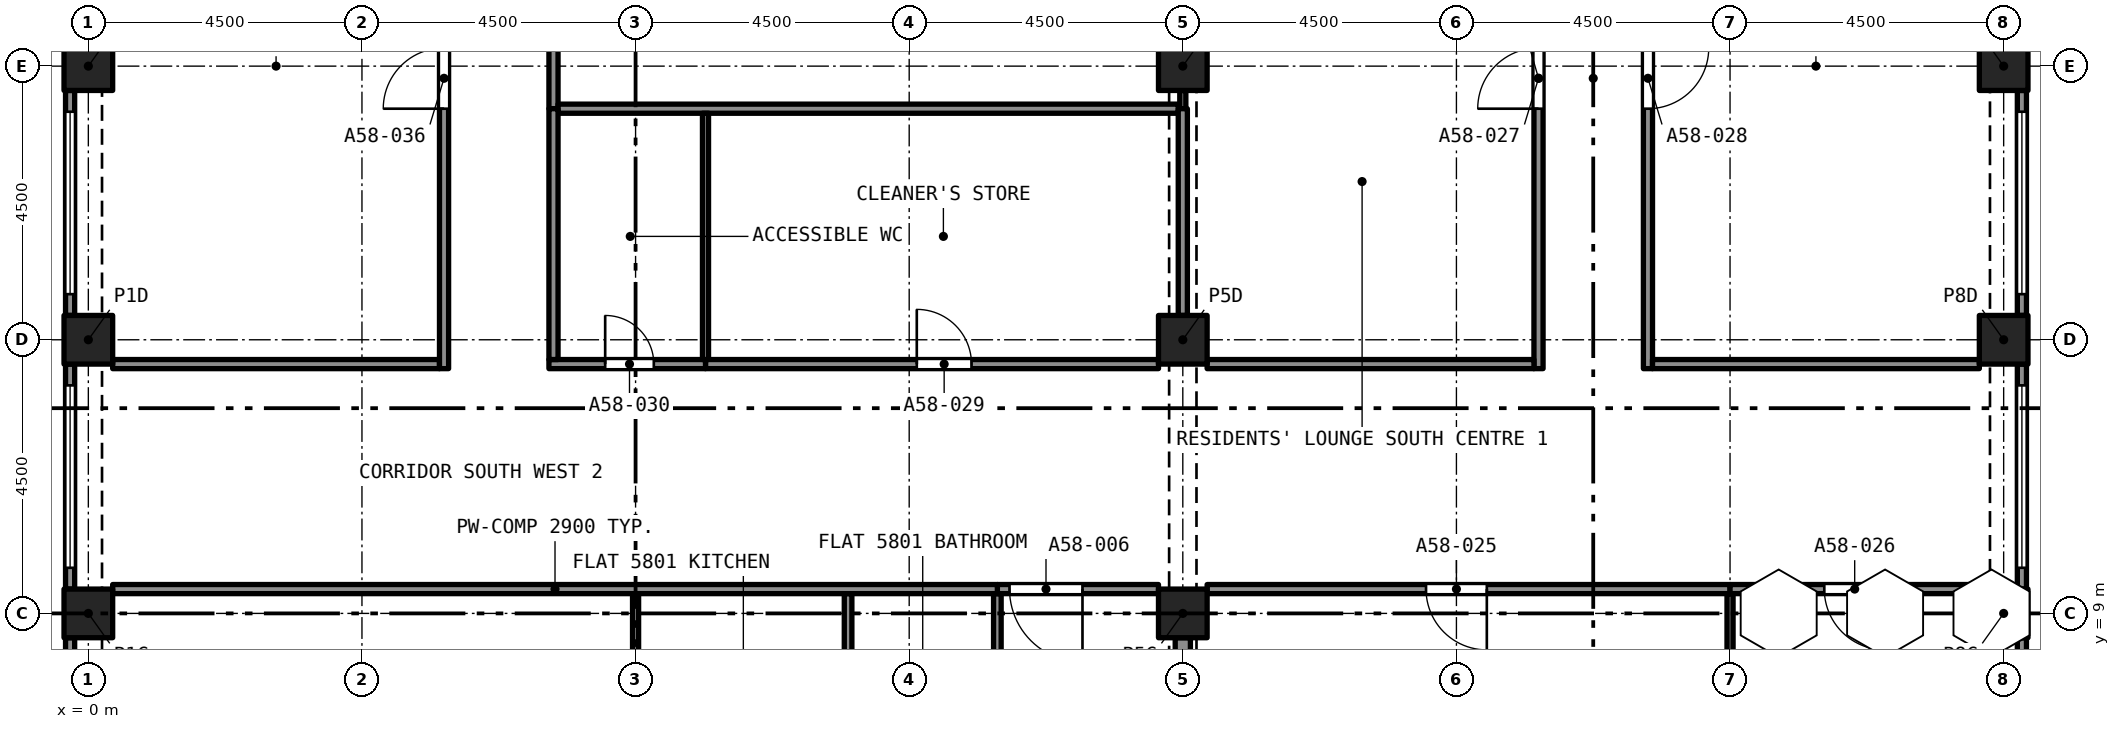
"""IFC4 building model, lengths in metres.
Left out: names, types, materials, properties, quantities, classifications, styles, units other than length and angle.
Written with IfcOpenShell. Run it as: python <this file> out.ifc"""

import sys

from ifc_helpers import new_model, si_unit, direction, frame, frame_2d, origin, origin_2d, place, context, subcontext, project, spatial, rectangle, extrude, element, fill, save


model = new_model("IFC4")
c1 = context("Model", 3, precision=1e-05, world=origin(), true_north=direction((0.0, 1.0)))
c2 = subcontext(c1, "Body", "Model", "MODEL_VIEW")
j1 = project(units=[si_unit("LENGTHUNIT", "METRE"), si_unit("PLANEANGLEUNIT", "RADIAN")], contexts=[c1])
p1 = place(None, origin())
s1 = spatial("IfcSite", under=j1, at=p1, CompositionType="ELEMENT")
p2 = place(p1, origin())
s2 = spatial("IfcBuilding", under=s1, at=p2, CompositionType="ELEMENT")
p3 = place(p2, frame((0.0, 0.0, 210.095)))
s3 = spatial("IfcBuildingStorey", under=s2, at=p3, CompositionType="ELEMENT", Elevation=210.095)
for number, where, z_axis, x_axis in (
    (1, (0.0, 9.0, 0.0), (0.0, 0.0, 1.0), (1.0, 0.0, 0.0)),
    (2, (18.0, 9.0, 0.0), (0.0, 0.0, 1.0), (1.0, 0.0, 0.0)),
    (3, (31.5, 9.0, 0.0), (0.0, 0.0, 1.0), (1.0, 0.0, 0.0)),
    (4, (0.0, 13.5, 0.0), (0.0, 0.0, 1.0), (1.0, 0.0, 0.0)),
    (5, (18.0, 13.5, 0.0), (0.0, 0.0, 1.0), (1.0, 0.0, 0.0)),
    (6, (31.5, 13.5, 0.0), (0.0, 0.0, 1.0), (1.0, 0.0, 0.0)),
    (7, (0.0, 18.0, 0.0), (0.0, 0.0, 1.0), (1.0, 0.0, 0.0)),
    (8, (18.0, 18.0, 0.0), (0.0, 0.0, 1.0), (1.0, 0.0, 0.0)),
    (9, (31.5, 18.0, 0.0), (0.0, 0.0, 1.0), (1.0, 0.0, 0.0)),
):
    element("IfcColumn", number, at=place(p3, frame(where, z_axis=z_axis, x_axis=x_axis)), inside=s3, PredefinedType="COLUMN", context=c2, shape_type="SweptSolid", body=[
        extrude(rectangle(XDim=0.8, YDim=0.8, at=origin_2d()), origin(), (0.0, 0.0, 1.0), 3.2),
    ])
p4 = place(p3, frame((31.8, 8.6, 0.0), z_axis=(0.0, 0.0, 1.0), x_axis=(0.0, -1.0, 0.0)))
e10 = element("IfcWall", 10, at=p4, inside=s3, PredefinedType="SOLIDWALL", context=c2, shape_type="SweptSolid", body=[
    extrude(rectangle(XDim=3.7, YDim=0.15, at=frame_2d((1.85, 0.0))), origin(), (0.0, 0.0, 1.0), 3.2),
])
p5 = place(p4, frame((0.35, 0.0, 0.45)))
e11 = element("IfcOpeningElement", 11, at=p5, cuts=e10, PredefinedType="OPENING", context=c2, shape_type="SweptSolid", body=[
    extrude(rectangle(XDim=3.0, YDim=1.95, at=frame_2d((1.5, 0.975))), frame((0.0, 0.085, 0.0), z_axis=(0.0, -1.0, 0.0), x_axis=(1.0, 0.0, 0.0)), (0.0, 0.0, 1.0), 0.17),
])
p6 = place(p3, frame((31.8, 13.1, 0.0), z_axis=(0.0, 0.0, 1.0), x_axis=(0.0, -1.0, 0.0)))
e12 = element("IfcWall", 12, at=p6, inside=s3, PredefinedType="SOLIDWALL", context=c2, shape_type="SweptSolid", body=[
    extrude(rectangle(XDim=3.7, YDim=0.15, at=frame_2d((1.85, 0.0))), origin(), (0.0, 0.0, 1.0), 3.2),
])
p7 = place(p6, frame((0.35, 0.0, 0.45)))
e13 = element("IfcOpeningElement", 13, at=p7, cuts=e12, PredefinedType="OPENING", context=c2, shape_type="SweptSolid", body=[
    extrude(rectangle(XDim=3.0, YDim=1.95, at=frame_2d((1.5, 0.975))), frame((0.0, 0.085, 0.0), z_axis=(0.0, -1.0, 0.0), x_axis=(1.0, 0.0, 0.0)), (0.0, 0.0, 1.0), 0.17),
])
p8 = place(p3, frame((31.8, 17.6, 0.0), z_axis=(0.0, 0.0, 1.0), x_axis=(0.0, -1.0, 0.0)))
e14 = element("IfcWall", 14, at=p8, inside=s3, PredefinedType="SOLIDWALL", context=c2, shape_type="SweptSolid", body=[
    extrude(rectangle(XDim=3.7, YDim=0.15, at=frame_2d((1.85, 0.0))), origin(), (0.0, 0.0, 1.0), 3.2),
])
p9 = place(p8, frame((0.35, 0.0, 0.45)))
e15 = element("IfcOpeningElement", 15, at=p9, cuts=e14, PredefinedType="OPENING", context=c2, shape_type="SweptSolid", body=[
    extrude(rectangle(XDim=3.0, YDim=1.95, at=frame_2d((1.5, 0.975))), frame((0.0, 0.085, 0.0), z_axis=(0.0, -1.0, 0.0), x_axis=(1.0, 0.0, 0.0)), (0.0, 0.0, 1.0), 0.17),
])
p10 = place(p3, frame((-0.3, 13.9, 0.0), z_axis=(0.0, 0.0, 1.0), x_axis=(0.0, 1.0, 0.0)))
e16 = element("IfcWall", 16, at=p10, inside=s3, PredefinedType="SOLIDWALL", context=c2, shape_type="SweptSolid", body=[
    extrude(rectangle(XDim=3.7, YDim=0.15, at=frame_2d((1.85, 0.0))), origin(), (0.0, 0.0, 1.0), 3.2),
])
p11 = place(p10, frame((0.35, 0.0, 0.45)))
e17 = element("IfcOpeningElement", 17, at=p11, cuts=e16, PredefinedType="OPENING", context=c2, shape_type="SweptSolid", body=[
    extrude(rectangle(XDim=3.0, YDim=1.95, at=frame_2d((1.5, 0.975))), frame((0.0, 0.085, 0.0), z_axis=(0.0, -1.0, 0.0), x_axis=(1.0, 0.0, 0.0)), (0.0, 0.0, 1.0), 0.17),
])
p12 = place(p3, frame((-0.3, 9.4, 0.0), z_axis=(0.0, 0.0, 1.0), x_axis=(0.0, 1.0, 0.0)))
e18 = element("IfcWall", 18, at=p12, inside=s3, PredefinedType="SOLIDWALL", context=c2, shape_type="SweptSolid", body=[
    extrude(rectangle(XDim=3.7, YDim=0.15, at=frame_2d((1.85, 0.0))), origin(), (0.0, 0.0, 1.0), 3.2),
])
p13 = place(p12, frame((0.35, 0.0, 0.45)))
e19 = element("IfcOpeningElement", 19, at=p13, cuts=e18, PredefinedType="OPENING", context=c2, shape_type="SweptSolid", body=[
    extrude(rectangle(XDim=3.0, YDim=1.95, at=frame_2d((1.5, 0.975))), frame((0.0, 0.085, 0.0), z_axis=(0.0, -1.0, 0.0), x_axis=(1.0, 0.0, 0.0)), (0.0, 0.0, 1.0), 0.17),
])
p14 = place(p3, frame((-0.3, 4.9, 0.0), z_axis=(0.0, 0.0, 1.0), x_axis=(0.0, 1.0, 0.0)))
e20 = element("IfcWall", 20, at=p14, inside=s3, PredefinedType="SOLIDWALL", context=c2, shape_type="SweptSolid", body=[
    extrude(rectangle(XDim=3.7, YDim=0.15, at=frame_2d((1.85, 0.0))), origin(), (0.0, 0.0, 1.0), 3.2),
])
p15 = place(p14, frame((0.35, 0.0, 0.45)))
e21 = element("IfcOpeningElement", 21, at=p15, cuts=e20, PredefinedType="OPENING", context=c2, shape_type="SweptSolid", body=[
    extrude(rectangle(XDim=3.0, YDim=1.95, at=frame_2d((1.5, 0.975))), frame((0.0, 0.085, 0.0), z_axis=(0.0, -1.0, 0.0), x_axis=(1.0, 0.0, 0.0)), (0.0, 0.0, 1.0), 0.17),
])
for number, where, z_axis, x_axis in (
    (22, (14.95, 6.242, 0.0), (0.0, 0.0, 1.0), (0.0, 1.0, 0.0)),
    (23, (12.495, 6.242, 0.0), (0.0, 0.0, 1.0), (0.0, 1.0, 0.0)),
):
    element("IfcWall", number, at=place(p3, frame(where, z_axis=z_axis, x_axis=x_axis)), inside=s3, PredefinedType="PARTITIONING", context=c2, shape_type="SweptSolid", body=[
        extrude(rectangle(XDim=3.083, YDim=0.125, at=frame_2d((1.541, 0.0))), origin(), (0.0, 0.0, 1.0), 2.9),
    ])
p16 = place(p3, frame((18.0, 4.9, 0.0), z_axis=(0.0, 0.0, 1.0), x_axis=(0.0, 1.0, 0.0)))
e24 = element("IfcWall", 24, at=p16, inside=s3, PredefinedType="PARTITIONING", context=c2, shape_type="SweptSolid", body=[
    extrude(rectangle(XDim=3.7, YDim=0.25, at=frame_2d((1.85, 0.0))), origin(), (0.0, 0.0, 1.0), 2.38),
])
p17 = place(p3, frame((17.6, 9.4, 0.0), z_axis=(0.0, 0.0, 1.0), x_axis=(-1.0, 0.0, 0.0)))
e25 = element("IfcWall", 25, at=p17, inside=s3, PredefinedType="PARTITIONING", context=c2, shape_type="SweptSolid", body=[
    extrude(rectangle(XDim=2.65, YDim=0.15, at=frame_2d((1.325, 0.0))), origin(), (0.0, 0.0, 1.0), 2.9),
])
p18 = place(p17, frame((1.25, 0.0, 0.0)))
e26 = element("IfcOpeningElement", 26, at=p18, cuts=e25, PredefinedType="OPENING", context=c2, shape_type="SweptSolid", body=[
    extrude(rectangle(XDim=1.2, YDim=2.4, at=frame_2d((0.6, 1.2))), frame((0.0, 0.085, 0.0), z_axis=(0.0, -1.0, 0.0), x_axis=(1.0, 0.0, 0.0)), (0.0, 0.0, 1.0), 0.17),
])
p19 = place(p3, frame((9.0, 6.18, 0.0), z_axis=(0.0, 0.0, 1.0), x_axis=(0.0, 1.0, 0.0)))
e27 = element("IfcWall", 27, at=p19, inside=s3, PredefinedType="PARTITIONING", context=c2, shape_type="SweptSolid", body=[
    extrude(rectangle(XDim=3.145, YDim=0.1, at=frame_2d((1.573, 0.0))), origin(), (0.0, 0.0, 1.0), 2.9),
])
p20 = place(p3, frame((0.4, 9.4, 0.0), z_axis=(0.0, 0.0, 1.0), x_axis=(1.0, 0.0, 0.0)))
e28 = element("IfcWall", 28, at=p20, inside=s3, PredefinedType="PARTITIONING", context=c2, shape_type="SweptSolid", body=[
    extrude(rectangle(XDim=14.55, YDim=0.15, at=frame_2d((7.275, 0.0))), origin(), (0.0, 0.0, 1.0), 2.9),
])
p21 = place(p3, frame((18.0, 17.3, 0.0), z_axis=(0.0, 0.0, 1.0), x_axis=(0.0, 1.0, 0.0)))
e29 = element("IfcWall", 29, at=p21, inside=s3, PredefinedType="PARTITIONING", context=c2, shape_type="SweptSolid", body=[
    extrude(rectangle(XDim=0.3, YDim=0.1, at=frame_2d((0.15, 0.0))), origin(), (0.0, 0.0, 1.0), 2.75),
])
p22 = place(p3, frame((7.65, 22.5, 0.0), z_axis=(0.0, 0.0, 1.0), x_axis=(0.0, -1.0, 0.0)))
e30 = element("IfcWall", 30, at=p22, inside=s3, PredefinedType="PARTITIONING", context=c2, shape_type="SweptSolid", body=[
    extrude(rectangle(XDim=5.2, YDim=0.15, at=frame_2d((2.6, 0.0))), origin(), (0.0, 0.0, 1.0), 2.9),
])
p23 = place(p22, frame((2.1, 0.0, 0.0)))
e31 = element("IfcOpeningElement", 31, at=p23, cuts=e30, PredefinedType="OPENING", context=c2, shape_type="SweptSolid", body=[
    extrude(rectangle(XDim=1.0, YDim=2.1, at=frame_2d((0.5, 1.05))), frame((0.0, 0.085, 0.0), z_axis=(0.0, -1.0, 0.0), x_axis=(1.0, 0.0, 0.0)), (0.0, 0.0, 1.0), 0.17),
])
p24 = place(p3, frame((7.725, 17.3, 0.0), z_axis=(0.0, 0.0, 1.0), x_axis=(1.0, 0.0, 0.0)))
e32 = element("IfcWall", 32, at=p24, inside=s3, PredefinedType="PARTITIONING", context=c2, shape_type="SweptSolid", body=[
    extrude(rectangle(XDim=10.2, YDim=0.15, at=frame_2d((5.1, 0.0))), origin(), (0.0, 0.0, 1.0), 2.9),
])
p25 = place(p3, frame((27.0, 0.433, 0.0), z_axis=(0.0, 0.0, 1.0), x_axis=(0.0, 1.0, 0.0)))
e33 = element("IfcWall", 33, at=p25, inside=s3, PredefinedType="PARTITIONING", context=c2, shape_type="SweptSolid", body=[
    extrude(rectangle(XDim=8.892, YDim=0.1, at=frame_2d((4.446, 0.0))), origin(), (0.0, 0.0, 1.0), 2.75),
])
p26 = place(p3, frame((27.0, 9.4, 0.0), z_axis=(0.0, 0.0, 1.0), x_axis=(-1.0, 0.0, 0.0)))
e34 = element("IfcWall", 34, at=p26, inside=s3, PredefinedType="PARTITIONING", context=c2, shape_type="SweptSolid", body=[
    extrude(rectangle(XDim=8.6, YDim=0.15, at=frame_2d((4.3, 0.0))), origin(), (0.0, 0.0, 1.0), 2.75),
])
p27 = place(p26, frame((4.0, 0.0, 0.0)))
e35 = element("IfcOpeningElement", 35, at=p27, cuts=e34, PredefinedType="OPENING", context=c2, shape_type="SweptSolid", body=[
    extrude(rectangle(XDim=1.0, YDim=2.1, at=frame_2d((0.5, 1.05))), frame((0.0, 0.085, 0.0), z_axis=(0.0, -1.0, 0.0), x_axis=(1.0, 0.0, 0.0)), (0.0, 0.0, 1.0), 0.17),
])
p28 = place(p3, frame((31.1, 9.4, 0.0), z_axis=(0.0, 0.0, 1.0), x_axis=(-1.0, 0.0, 0.0)))
e36 = element("IfcWall", 36, at=p28, inside=s3, PredefinedType="PARTITIONING", context=c2, shape_type="SweptSolid", body=[
    extrude(rectangle(XDim=4.1, YDim=0.15, at=frame_2d((2.05, 0.0))), origin(), (0.0, 0.0, 1.0), 2.75),
])
p29 = place(p28, frame((1.55, 0.0, 0.0)))
e37 = element("IfcOpeningElement", 37, at=p29, cuts=e36, PredefinedType="OPENING", context=c2, shape_type="SweptSolid", body=[
    extrude(rectangle(XDim=1.0, YDim=2.1, at=frame_2d((0.5, 1.05))), frame((0.0, 0.085, 0.0), z_axis=(0.0, -1.0, 0.0), x_axis=(1.0, 0.0, 0.0)), (0.0, 0.0, 1.0), 0.17),
])
p30 = place(p3, frame((23.85, 13.025, 0.0), z_axis=(0.0, 0.0, 1.0), x_axis=(0.0, 1.0, 0.0)))
e38 = element("IfcWall", 38, at=p30, inside=s3, PredefinedType="PARTITIONING", context=c2, shape_type="SweptSolid", body=[
    extrude(rectangle(XDim=9.55, YDim=0.15, at=frame_2d((4.775, 0.0))), origin(), (0.0, 0.0, 1.0), 2.75),
])
p31 = place(p30, frame((4.275, 0.0, 0.0)))
e39 = element("IfcOpeningElement", 39, at=p31, cuts=e38, PredefinedType="OPENING", context=c2, shape_type="SweptSolid", body=[
    extrude(rectangle(XDim=1.0, YDim=2.1, at=frame_2d((0.5, 1.05))), frame((0.0, 0.085, 0.0), z_axis=(0.0, -1.0, 0.0), x_axis=(1.0, 0.0, 0.0)), (0.0, 0.0, 1.0), 0.17),
])
p32 = place(p3, frame((25.65, 22.575, 0.0), z_axis=(0.0, 0.0, 1.0), x_axis=(0.0, -1.0, 0.0)))
e40 = element("IfcWall", 40, at=p32, inside=s3, PredefinedType="PARTITIONING", context=c2, shape_type="SweptSolid", body=[
    extrude(rectangle(XDim=9.55, YDim=0.15, at=frame_2d((4.775, 0.0))), origin(), (0.0, 0.0, 1.0), 2.75),
])
p33 = place(p32, frame((4.275, 0.0, 0.0)))
e41 = element("IfcOpeningElement", 41, at=p33, cuts=e40, PredefinedType="OPENING", context=c2, shape_type="SweptSolid", body=[
    extrude(rectangle(XDim=1.0, YDim=2.1, at=frame_2d((0.5, 1.05))), frame((0.0, 0.085, 0.0), z_axis=(0.0, -1.0, 0.0), x_axis=(1.0, 0.0, 0.0)), (0.0, 0.0, 1.0), 0.17),
])
for number, where, z_axis, x_axis in (
    (42, (18.4, 13.1, 0.0), (0.0, 0.0, 1.0), (1.0, 0.0, 0.0)),
    (43, (25.725, 13.1, 0.0), (0.0, 0.0, 1.0), (1.0, 0.0, 0.0)),
):
    element("IfcWall", number, at=place(p3, frame(where, z_axis=z_axis, x_axis=x_axis)), inside=s3, PredefinedType="PARTITIONING", context=c2, shape_type="SweptSolid", body=[
        extrude(rectangle(XDim=5.375, YDim=0.15, at=frame_2d((2.688, 0.0))), origin(), (0.0, 0.0, 1.0), 2.75),
    ])
p34 = place(p3, frame((10.15, 13.1, 0.0), z_axis=(0.0, 0.0, 1.0), x_axis=(1.0, 0.0, 0.0)))
e44 = element("IfcWall", 44, at=p34, inside=s3, PredefinedType="PARTITIONING", context=c2, shape_type="SweptSolid", body=[
    extrude(rectangle(XDim=7.45, YDim=0.15, at=frame_2d((3.725, 0.0))), origin(), (0.0, 0.0, 1.0), 2.9),
])
p35 = place(p34, frame((3.475, 0.0, 0.0)))
e45 = element("IfcOpeningElement", 45, at=p35, cuts=e44, PredefinedType="OPENING", context=c2, shape_type="SweptSolid", body=[
    extrude(rectangle(XDim=0.9, YDim=2.1, at=frame_2d((0.45, 1.05))), frame((0.0, 0.085, 0.0), z_axis=(0.0, -1.0, 0.0), x_axis=(1.0, 0.0, 0.0)), (0.0, 0.0, 1.0), 0.17),
])
p36 = place(p3, frame((7.575, 13.1, 0.0), z_axis=(0.0, 0.0, 1.0), x_axis=(1.0, 0.0, 0.0)))
e46 = element("IfcWall", 46, at=p36, inside=s3, PredefinedType="PARTITIONING", context=c2, shape_type="SweptSolid", body=[
    extrude(rectangle(XDim=2.575, YDim=0.15, at=frame_2d((1.288, 0.0))), origin(), (0.0, 0.0, 1.0), 2.9),
])
p37 = place(p36, frame((0.925, 0.0, 0.0)))
e47 = element("IfcOpeningElement", 47, at=p37, cuts=e46, PredefinedType="OPENING", context=c2, shape_type="SweptSolid", body=[
    extrude(rectangle(XDim=0.8, YDim=2.1, at=frame_2d((0.4, 1.05))), frame((0.0, 0.085, 0.0), z_axis=(0.0, -1.0, 0.0), x_axis=(1.0, 0.0, 0.0)), (0.0, 0.0, 1.0), 0.17),
])
p38 = place(p3, frame((0.4, 13.1, 0.0), z_axis=(0.0, 0.0, 1.0), x_axis=(1.0, 0.0, 0.0)))
e48 = element("IfcWall", 48, at=p38, inside=s3, PredefinedType="PARTITIONING", context=c2, shape_type="SweptSolid", body=[
    extrude(rectangle(XDim=5.375, YDim=0.15, at=frame_2d((2.688, 0.0))), origin(), (0.0, 0.0, 1.0), 2.9),
])
p39 = place(p3, frame((18.0, 13.9, 0.0), z_axis=(0.0, 0.0, 1.0), x_axis=(0.0, 1.0, 0.0)))
e49 = element("IfcWall", 49, at=p39, inside=s3, PredefinedType="PARTITIONING", context=c2, shape_type="SweptSolid", body=[
    extrude(rectangle(XDim=3.4, YDim=0.15, at=frame_2d((1.7, 0.0))), origin(), (0.0, 0.0, 1.0), 2.38),
])
p40 = place(p3, frame((7.65, 13.175, 0.0), z_axis=(0.0, 0.0, 1.0), x_axis=(0.0, 1.0, 0.0)))
e50 = element("IfcWall", 50, at=p40, inside=s3, PredefinedType="PARTITIONING", context=c2, shape_type="SweptSolid", body=[
    extrude(rectangle(XDim=4.125, YDim=0.15, at=frame_2d((2.062, 0.0))), origin(), (0.0, 0.0, 1.0), 2.9),
])
p41 = place(p3, frame((5.85, 13.025, 0.0), z_axis=(0.0, 0.0, 1.0), x_axis=(0.0, 1.0, 0.0)))
e51 = element("IfcWall", 51, at=p41, inside=s3, PredefinedType="PARTITIONING", context=c2, shape_type="SweptSolid", body=[
    extrude(rectangle(XDim=9.475, YDim=0.15, at=frame_2d((4.738, 0.0))), origin(), (0.0, 0.0, 1.0), 2.9),
])
p42 = place(p41, frame((4.275, 0.0, 0.0)))
e52 = element("IfcOpeningElement", 52, at=p42, cuts=e51, PredefinedType="OPENING", context=c2, shape_type="SweptSolid", body=[
    extrude(rectangle(XDim=1.0, YDim=2.1, at=frame_2d((0.5, 1.05))), frame((0.0, 0.085, 0.0), z_axis=(0.0, -1.0, 0.0), x_axis=(1.0, 0.0, 0.0)), (0.0, 0.0, 1.0), 0.17),
])
p43 = place(p3, frame((10.15, 13.175, 0.0), z_axis=(0.0, 0.0, 1.0), x_axis=(0.0, 1.0, 0.0)))
e53 = element("IfcWall", 53, at=p43, inside=s3, PredefinedType="PARTITIONING", context=c2, shape_type="SweptSolid", body=[
    extrude(rectangle(XDim=4.05, YDim=0.1, at=frame_2d((2.025, 0.0))), origin(), (0.0, 0.0, 1.0), 2.9),
])
p44 = place(p7, origin())
e54 = element("IfcWindow", 54, at=p44, inside=s3, PartitioningType="SINGLE_PANEL", PredefinedType="WINDOW", context=c2, shape_type="SweptSolid", body=[
    extrude(rectangle(XDim=3.0, YDim=1.95, at=frame_2d((1.5, 0.975))), frame((0.0, 0.03, 0.0), z_axis=(0.0, -1.0, 0.0), x_axis=(1.0, 0.0, 0.0)), (0.0, 0.0, 1.0), 0.06),
])
fill(e13, e54)
p45 = place(p9, origin())
e55 = element("IfcWindow", 55, at=p45, inside=s3, PartitioningType="SINGLE_PANEL", PredefinedType="WINDOW", context=c2, shape_type="SweptSolid", body=[
    extrude(rectangle(XDim=3.0, YDim=1.95, at=frame_2d((1.5, 0.975))), frame((0.0, 0.03, 0.0), z_axis=(0.0, -1.0, 0.0), x_axis=(1.0, 0.0, 0.0)), (0.0, 0.0, 1.0), 0.06),
])
fill(e15, e55)
p46 = place(p11, origin())
e56 = element("IfcWindow", 56, at=p46, inside=s3, PartitioningType="SINGLE_PANEL", PredefinedType="WINDOW", context=c2, shape_type="SweptSolid", body=[
    extrude(rectangle(XDim=3.0, YDim=1.95, at=frame_2d((1.5, 0.975))), frame((0.0, 0.03, 0.0), z_axis=(0.0, -1.0, 0.0), x_axis=(1.0, 0.0, 0.0)), (0.0, 0.0, 1.0), 0.06),
])
fill(e17, e56)
p47 = place(p13, origin())
e57 = element("IfcWindow", 57, at=p47, inside=s3, PartitioningType="SINGLE_PANEL", PredefinedType="WINDOW", context=c2, shape_type="SweptSolid", body=[
    extrude(rectangle(XDim=3.0, YDim=1.95, at=frame_2d((1.5, 0.975))), frame((0.0, 0.03, 0.0), z_axis=(0.0, -1.0, 0.0), x_axis=(1.0, 0.0, 0.0)), (0.0, 0.0, 1.0), 0.06),
])
fill(e19, e57)
p48 = place(p18, origin())
e58 = element("IfcDoor", 58, at=p48, inside=s3, OperationType="SINGLE_SWING_RIGHT", PredefinedType="DOOR", context=c2, shape_type="SweptSolid", body=[
    extrude(rectangle(XDim=1.2, YDim=2.4, at=frame_2d((0.6, 1.2))), frame((0.0, 0.025, 0.0), z_axis=(0.0, -1.0, 0.0), x_axis=(1.0, 0.0, 0.0)), (0.0, 0.0, 1.0), 0.05),
])
fill(e26, e58)
p49 = place(p27, origin())
e59 = element("IfcDoor", 59, at=p49, inside=s3, OperationType="SINGLE_SWING_RIGHT", PredefinedType="DOOR", context=c2, shape_type="SweptSolid", body=[
    extrude(rectangle(XDim=1.0, YDim=2.1, at=frame_2d((0.5, 1.05))), frame((0.0, 0.025, 0.0), z_axis=(0.0, -1.0, 0.0), x_axis=(1.0, 0.0, 0.0)), (0.0, 0.0, 1.0), 0.05),
])
fill(e35, e59)
p50 = place(p29, origin())
e60 = element("IfcDoor", 60, at=p50, inside=s3, OperationType="SINGLE_SWING_RIGHT", PredefinedType="DOOR", context=c2, shape_type="SweptSolid", body=[
    extrude(rectangle(XDim=1.0, YDim=2.1, at=frame_2d((0.5, 1.05))), frame((0.0, 0.025, 0.0), z_axis=(0.0, -1.0, 0.0), x_axis=(1.0, 0.0, 0.0)), (0.0, 0.0, 1.0), 0.05),
])
fill(e37, e60)
p51 = place(p31, origin())
e61 = element("IfcDoor", 61, at=p51, inside=s3, OperationType="SINGLE_SWING_RIGHT", PredefinedType="DOOR", context=c2, shape_type="SweptSolid", body=[
    extrude(rectangle(XDim=1.0, YDim=2.1, at=frame_2d((0.5, 1.05))), frame((0.0, 0.025, 0.0), z_axis=(0.0, -1.0, 0.0), x_axis=(1.0, 0.0, 0.0)), (0.0, 0.0, 1.0), 0.05),
])
fill(e39, e61)
p52 = place(p33, origin())
e62 = element("IfcDoor", 62, at=p52, inside=s3, OperationType="SINGLE_SWING_LEFT", PredefinedType="DOOR", context=c2, shape_type="SweptSolid", body=[
    extrude(rectangle(XDim=1.0, YDim=2.1, at=frame_2d((0.5, 1.05))), frame((0.0, 0.025, 0.0), z_axis=(0.0, -1.0, 0.0), x_axis=(1.0, 0.0, 0.0)), (0.0, 0.0, 1.0), 0.05),
])
fill(e41, e62)
p53 = place(p35, origin())
e63 = element("IfcDoor", 63, at=p53, inside=s3, OperationType="SINGLE_SWING_RIGHT", PredefinedType="DOOR", context=c2, shape_type="SweptSolid", body=[
    extrude(rectangle(XDim=0.9, YDim=2.1, at=frame_2d((0.45, 1.05))), frame((0.0, 0.025, 0.0), z_axis=(0.0, -1.0, 0.0), x_axis=(1.0, 0.0, 0.0)), (0.0, 0.0, 1.0), 0.05),
])
fill(e45, e63)
p54 = place(p37, origin())
e64 = element("IfcDoor", 64, at=p54, inside=s3, OperationType="SINGLE_SWING_RIGHT", PredefinedType="DOOR", context=c2, shape_type="SweptSolid", body=[
    extrude(rectangle(XDim=0.8, YDim=2.1, at=frame_2d((0.4, 1.05))), frame((0.0, 0.025, 0.0), z_axis=(0.0, -1.0, 0.0), x_axis=(1.0, 0.0, 0.0)), (0.0, 0.0, 1.0), 0.05),
])
fill(e47, e64)
p55 = place(p42, origin())
e65 = element("IfcDoor", 65, at=p55, inside=s3, OperationType="SINGLE_SWING_RIGHT", PredefinedType="DOOR", context=c2, shape_type="SweptSolid", body=[
    extrude(rectangle(XDim=1.0, YDim=2.1, at=frame_2d((0.5, 1.05))), frame((0.0, 0.025, 0.0), z_axis=(0.0, -1.0, 0.0), x_axis=(1.0, 0.0, 0.0)), (0.0, 0.0, 1.0), 0.05),
])
fill(e52, e65)
save(model, sys.argv[1])
